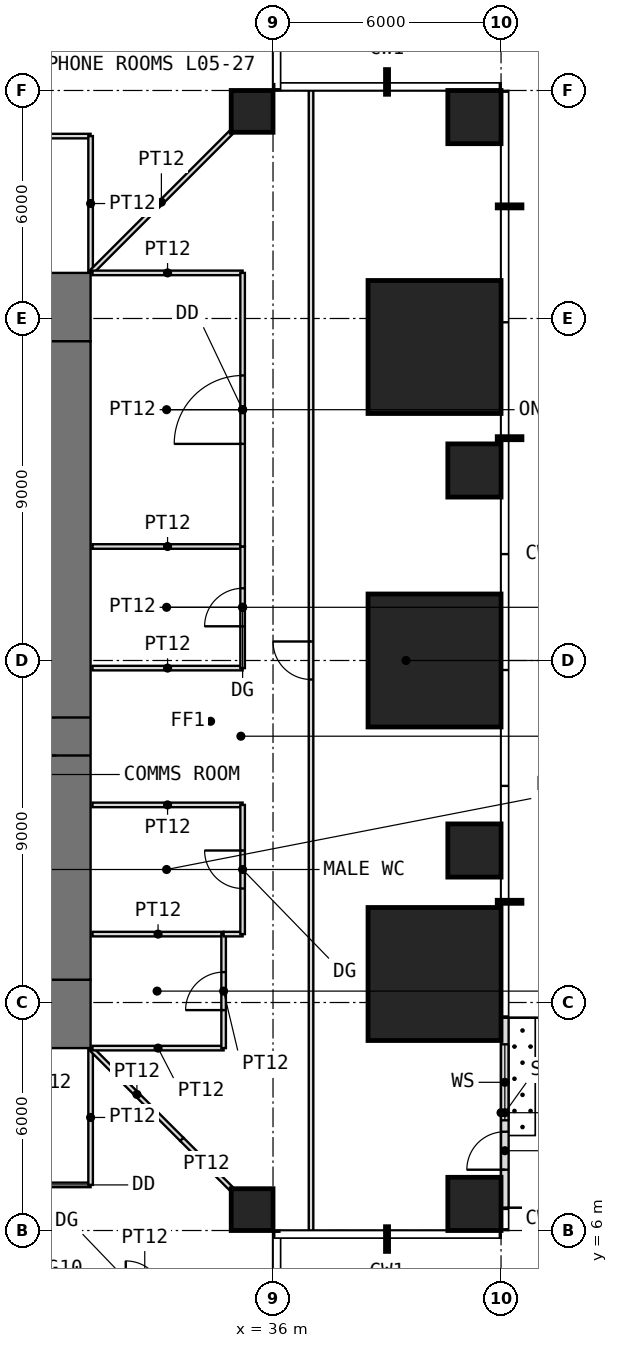
"""IFC4 building model, lengths in metres.
Left out: names, types, materials, properties, quantities, classifications, styles, units other than length and angle.
Written with IfcOpenShell. Run it as: python <this file> out.ifc"""

import sys

from ifc_helpers import new_model, si_unit, direction, frame, frame_2d, origin, origin_2d, place, context, subcontext, project, spatial, rectangle, extrude, element, fill, save


model = new_model("IFC4")
c1 = context("Model", 3, precision=1e-05, world=origin(), true_north=direction((0.0, 1.0)))
c2 = subcontext(c1, "Body", "Model", "MODEL_VIEW")
j1 = project(units=[si_unit("LENGTHUNIT", "METRE"), si_unit("PLANEANGLEUNIT", "RADIAN")], contexts=[c1])
p1 = place(None, origin())
s1 = spatial("IfcSite", under=j1, at=p1, CompositionType="ELEMENT")
p2 = place(p1, origin())
s2 = spatial("IfcBuilding", under=s1, at=p2, CompositionType="ELEMENT")
p3 = place(p2, frame((0.0, 0.0, 26.5)))
s3 = spatial("IfcBuildingStorey", under=s2, at=p3, CompositionType="ELEMENT", Elevation=26.5)
p4 = place(p3, frame((35.45, 6.55, 0.0), z_axis=(0.0, 0.0, 1.0), x_axis=(1.0, 0.0, 0.0)))
e1 = element("IfcColumn", 1, at=p4, inside=s3, PredefinedType="COLUMN", context=c2, shape_type="SweptSolid", body=[
    extrude(rectangle(XDim=1.1, YDim=1.1, at=origin_2d()), origin(), (0.0, 0.0, 1.0), 4.0),
])
p5 = place(p3, frame((41.3, 6.7, 0.0), z_axis=(0.0, 0.0, 1.0), x_axis=(1.0, 0.0, 0.0)))
e2 = element("IfcColumn", 2, at=p5, inside=s3, PredefinedType="COLUMN", context=c2, shape_type="SweptSolid", body=[
    extrude(rectangle(XDim=1.4, YDim=1.4, at=origin_2d()), origin(), (0.0, 0.0, 1.0), 4.0),
])
p6 = place(p3, frame((40.25, 12.75, 0.0), z_axis=(0.0, 0.0, 1.0), x_axis=(1.0, 0.0, 0.0)))
e3 = element("IfcColumn", 3, at=p6, inside=s3, PredefinedType="COLUMN", context=c2, shape_type="SweptSolid", body=[
    extrude(rectangle(XDim=3.5, YDim=3.5, at=origin_2d()), origin(), (0.0, 0.0, 1.0), 4.0),
])
p7 = place(p3, frame((41.3, 16.0, 0.0), z_axis=(0.0, 0.0, 1.0), x_axis=(1.0, 0.0, 0.0)))
e4 = element("IfcColumn", 4, at=p7, inside=s3, PredefinedType="COLUMN", context=c2, shape_type="SweptSolid", body=[
    extrude(rectangle(XDim=1.4, YDim=1.4, at=origin_2d()), origin(), (0.0, 0.0, 1.0), 4.0),
])
p8 = place(p3, frame((40.25, 21.0, 0.0), z_axis=(0.0, 0.0, 1.0), x_axis=(1.0, 0.0, 0.0)))
e5 = element("IfcColumn", 5, at=p8, inside=s3, PredefinedType="COLUMN", context=c2, shape_type="SweptSolid", body=[
    extrude(rectangle(XDim=3.5, YDim=3.5, at=origin_2d()), origin(), (0.0, 0.0, 1.0), 4.0),
])
p9 = place(p3, frame((41.3, 26.0, 0.0), z_axis=(0.0, 0.0, 1.0), x_axis=(1.0, 0.0, 0.0)))
e6 = element("IfcColumn", 6, at=p9, inside=s3, PredefinedType="COLUMN", context=c2, shape_type="SweptSolid", body=[
    extrude(rectangle(XDim=1.4, YDim=1.4, at=origin_2d()), origin(), (0.0, 0.0, 1.0), 4.0),
])
p10 = place(p3, frame((40.25, 29.25, 0.0), z_axis=(0.0, 0.0, 1.0), x_axis=(1.0, 0.0, 0.0)))
e7 = element("IfcColumn", 7, at=p10, inside=s3, PredefinedType="COLUMN", context=c2, shape_type="SweptSolid", body=[
    extrude(rectangle(XDim=3.5, YDim=3.5, at=origin_2d()), origin(), (0.0, 0.0, 1.0), 4.0),
])
p11 = place(p3, frame((35.45, 35.45, 0.0), z_axis=(0.0, 0.0, 1.0), x_axis=(1.0, 0.0, 0.0)))
e8 = element("IfcColumn", 8, at=p11, inside=s3, PredefinedType="COLUMN", context=c2, shape_type="SweptSolid", body=[
    extrude(rectangle(XDim=1.1, YDim=1.1, at=origin_2d()), origin(), (0.0, 0.0, 1.0), 4.0),
])
p12 = place(p3, frame((41.3, 35.3, 0.0), z_axis=(0.0, 0.0, 1.0), x_axis=(1.0, 0.0, 0.0)))
e9 = element("IfcColumn", 9, at=p12, inside=s3, PredefinedType="COLUMN", context=c2, shape_type="SweptSolid", body=[
    extrude(rectangle(XDim=1.4, YDim=1.4, at=origin_2d()), origin(), (0.0, 0.0, 1.0), 4.0),
])
p13 = place(p3, frame((42.1, 6.6, 0.0), z_axis=(0.0, 0.0, 1.0), x_axis=(0.0, 1.0, 0.0)))
e10 = element("IfcWall", 10, at=p13, inside=s3, PredefinedType="USERDEFINED", context=c2, shape_type="SweptSolid", body=[
    extrude(rectangle(XDim=5.0, YDim=0.2, at=frame_2d((2.5, 0.0))), origin(), (0.0, 0.0, 1.0), 3.75),
])
p14 = place(p13, frame((1.0, 0.0, 0.0)))
e11 = element("IfcOpeningElement", 11, at=p14, cuts=e10, PredefinedType="OPENING", context=c2, shape_type="SweptSolid", body=[
    extrude(rectangle(XDim=1.0, YDim=2.4, at=frame_2d((0.5, 1.2))), frame((0.0, 0.11, 0.0), z_axis=(0.0, -1.0, 0.0), x_axis=(1.0, 0.0, 0.0)), (0.0, 0.0, 1.0), 0.22),
])
p15 = place(p13, frame((2.3, 0.0, 0.3)))
e12 = element("IfcOpeningElement", 12, at=p15, cuts=e10, PredefinedType="OPENING", context=c2, shape_type="SweptSolid", body=[
    extrude(rectangle(XDim=2.0, YDim=2.7, at=frame_2d((1.0, 1.35))), frame((0.0, 0.11, 0.0), z_axis=(0.0, -1.0, 0.0), x_axis=(1.0, 0.0, 0.0)), (0.0, 0.0, 1.0), 0.22),
])
p16 = place(p3, frame((10.8, 11.7, -0.05), z_axis=(0.0, 0.0, 1.0), x_axis=(1.0, 0.0, 0.0)))
e13 = element("IfcWall", 13, at=p16, inside=s3, PredefinedType="SHEAR", context=c2, shape_type="SweptSolid", body=[
    extrude(rectangle(XDim=20.4, YDim=1.8, at=frame_2d((10.2, 0.0))), origin(), (0.0, 0.0, 1.0), 4.0),
])
p17 = place(p16, frame((9.2, 0.0, 0.05)))
e14 = element("IfcOpeningElement", 14, at=p17, cuts=e13, PredefinedType="OPENING", context=c2, shape_type="SweptSolid", body=[
    extrude(rectangle(XDim=2.0, YDim=2.2, at=frame_2d((1.0, 1.1))), frame((0.0, 0.91, 0.0), z_axis=(0.0, -1.0, 0.0), x_axis=(1.0, 0.0, 0.0)), (0.0, 0.0, 1.0), 1.82),
])
p18 = place(p3, frame((10.8, 30.3, -0.05), z_axis=(0.0, 0.0, 1.0), x_axis=(1.0, 0.0, 0.0)))
e15 = element("IfcWall", 15, at=p18, inside=s3, PredefinedType="SHEAR", context=c2, shape_type="SweptSolid", body=[
    extrude(rectangle(XDim=20.4, YDim=1.8, at=frame_2d((10.2, 0.0))), origin(), (0.0, 0.0, 1.0), 4.0),
])
p19 = place(p18, frame((9.2, 0.0, 0.05)))
e16 = element("IfcOpeningElement", 16, at=p19, cuts=e15, PredefinedType="OPENING", context=c2, shape_type="SweptSolid", body=[
    extrude(rectangle(XDim=2.0, YDim=2.2, at=frame_2d((1.0, 1.1))), frame((0.0, 0.91, 0.0), z_axis=(0.0, -1.0, 0.0), x_axis=(1.0, 0.0, 0.0)), (0.0, 0.0, 1.0), 1.82),
])
p20 = place(p3, frame((30.3, 12.6, -0.05), z_axis=(0.0, 0.0, 1.0), x_axis=(0.0, 1.0, 0.0)))
e17 = element("IfcWall", 17, at=p20, inside=s3, PredefinedType="SHEAR", context=c2, shape_type="SweptSolid", body=[
    extrude(rectangle(XDim=16.8, YDim=1.8, at=frame_2d((8.4, 0.0))), origin(), (0.0, 0.0, 1.0), 4.0),
])
p21 = place(p20, frame((5.9, 0.0, 0.05)))
e18 = element("IfcOpeningElement", 18, at=p21, cuts=e17, PredefinedType="OPENING", context=c2, shape_type="SweptSolid", body=[
    extrude(rectangle(XDim=1.0, YDim=2.2, at=frame_2d((0.5, 1.1))), frame((0.0, 0.91, 0.0), z_axis=(0.0, -1.0, 0.0), x_axis=(1.0, 0.0, 0.0)), (0.0, 0.0, 1.0), 1.82),
])
p22 = place(p3, frame((23.6, 7.2, 0.0), z_axis=(0.0, 0.0, 1.0), x_axis=(1.0, 0.0, 0.0)))
e19 = element("IfcWall", 19, at=p22, inside=s3, PredefinedType="PARTITIONING", context=c2, shape_type="SweptSolid", body=[
    extrude(rectangle(XDim=7.6, YDim=0.12, at=frame_2d((3.8, 0.0))), origin(), (0.0, 0.0, 1.0), 3.75),
])
p23 = place(p22, frame((2.9, 0.0, 0.0)))
e20 = element("IfcOpeningElement", 20, at=p23, cuts=e19, PredefinedType="OPENING", context=c2, shape_type="SweptSolid", body=[
    extrude(rectangle(XDim=1.8, YDim=2.4, at=frame_2d((0.9, 1.2))), frame((0.0, 0.07, 0.0), z_axis=(0.0, -1.0, 0.0), x_axis=(1.0, 0.0, 0.0)), (0.0, 0.0, 1.0), 0.14),
])
p24 = place(p3, frame((27.0, 34.8, 0.0), z_axis=(0.0, 0.0, 1.0), x_axis=(1.0, 0.0, 0.0)))
e21 = element("IfcWall", 21, at=p24, inside=s3, PredefinedType="PARTITIONING", context=c2, shape_type="SweptSolid", body=[
    extrude(rectangle(XDim=4.2, YDim=0.12, at=frame_2d((2.1, 0.0))), origin(), (0.0, 0.0, 1.0), 3.75),
])
p25 = place(p24, frame((1.6, 0.0, 0.0)))
e22 = element("IfcOpeningElement", 22, at=p25, cuts=e21, PredefinedType="OPENING", context=c2, shape_type="SweptSolid", body=[
    extrude(rectangle(XDim=1.0, YDim=2.4, at=frame_2d((0.5, 1.2))), frame((0.0, 0.07, 0.0), z_axis=(0.0, -1.0, 0.0), x_axis=(1.0, 0.0, 0.0)), (0.0, 0.0, 1.0), 0.14),
])
for number, where, z_axis, x_axis in (
    (23, (31.2, 7.2, 0.0), (0.0, 0.0, 1.0), (0.0, 1.0, 0.0)),
    (24, (31.2, 31.25, 0.0), (0.0, 0.0, 1.0), (0.0, 1.0, 0.0)),
):
    element("IfcWall", number, at=place(p3, frame(where, z_axis=z_axis, x_axis=x_axis)), inside=s3, PredefinedType="PARTITIONING", context=c2, shape_type="SweptSolid", body=[
        extrude(rectangle(XDim=3.55, YDim=0.12, at=frame_2d((1.775, 0.0))), origin(), (0.0, 0.0, 1.0), 3.75),
    ])
p26 = place(p3, frame((31.235, 10.765, 0.0), z_axis=(0.0, 0.0, 1.0), x_axis=(0.707106781187, -0.707106781187, 0.0)))
e25 = element("IfcWall", 25, at=p26, inside=s3, PredefinedType="PARTITIONING", context=c2, shape_type="SweptSolid", body=[
    extrude(rectangle(XDim=3.346, YDim=0.12, at=frame_2d((1.673, 0.0))), origin(), (0.0, 0.0, 1.0), 3.75),
])
p27 = place(p3, frame((31.235, 31.235, 0.0), z_axis=(0.0, 0.0, 1.0), x_axis=(0.707106781187, 0.707106781187, 0.0)))
e26 = element("IfcWall", 26, at=p27, inside=s3, PredefinedType="PARTITIONING", context=c2, shape_type="SweptSolid", body=[
    extrude(rectangle(XDim=5.168, YDim=0.12, at=frame_2d((2.584, 0.0))), origin(), (0.0, 0.0, 1.0), 3.75),
])
for number, where, z_axis, x_axis in (
    (27, (31.25, 10.8, 0.0), (0.0, 0.0, 1.0), (1.0, 0.0, 0.0)),
    (28, (31.25, 13.8, 0.0), (0.0, 0.0, 1.0), (1.0, 0.0, 0.0)),
):
    element("IfcWall", number, at=place(p3, frame(where, z_axis=z_axis, x_axis=x_axis)), inside=s3, PredefinedType="PARTITIONING", context=c2, shape_type="SweptSolid", body=[
        extrude(rectangle(XDim=3.45, YDim=0.12, at=frame_2d((1.725, 0.0))), origin(), (0.0, 0.0, 1.0), 3.75),
    ])
for number, where, z_axis, x_axis in (
    (29, (31.25, 17.2, 0.0), (0.0, 0.0, 1.0), (1.0, 0.0, 0.0)),
    (30, (31.25, 20.8, 0.0), (0.0, 0.0, 1.0), (1.0, 0.0, 0.0)),
    (31, (31.25, 24.0, 0.0), (0.0, 0.0, 1.0), (1.0, 0.0, 0.0)),
    (32, (31.25, 31.2, 0.0), (0.0, 0.0, 1.0), (1.0, 0.0, 0.0)),
):
    element("IfcWall", number, at=place(p3, frame(where, z_axis=z_axis, x_axis=x_axis)), inside=s3, PredefinedType="PARTITIONING", context=c2, shape_type="SweptSolid", body=[
        extrude(rectangle(XDim=3.95, YDim=0.12, at=frame_2d((1.975, 0.0))), origin(), (0.0, 0.0, 1.0), 3.75),
    ])
p28 = place(p3, frame((33.602, 8.398, 0.0), z_axis=(0.0, 0.0, 1.0), x_axis=(0.707106781187, -0.707106781187, 0.0)))
e33 = element("IfcWall", 33, at=p28, inside=s3, PredefinedType="PARTITIONING", context=c2, shape_type="SweptSolid", body=[
    extrude(rectangle(XDim=1.822, YDim=0.12, at=frame_2d((0.911, 0.0))), origin(), (0.0, 0.0, 1.0), 3.75),
])
p29 = place(p3, frame((34.7, 10.8, 0.0), z_axis=(0.0, 0.0, 1.0), x_axis=(0.0, 1.0, 0.0)))
e34 = element("IfcWall", 34, at=p29, inside=s3, PredefinedType="PARTITIONING", context=c2, shape_type="SweptSolid", body=[
    extrude(rectangle(XDim=3.0, YDim=0.12, at=frame_2d((1.5, 0.0))), origin(), (0.0, 0.0, 1.0), 3.75),
])
p30 = place(p29, frame((1.0, 0.0, 0.0)))
e35 = element("IfcOpeningElement", 35, at=p30, cuts=e34, PredefinedType="OPENING", context=c2, shape_type="SweptSolid", body=[
    extrude(rectangle(XDim=1.0, YDim=2.2, at=frame_2d((0.5, 1.1))), frame((0.0, 0.07, 0.0), z_axis=(0.0, -1.0, 0.0), x_axis=(1.0, 0.0, 0.0)), (0.0, 0.0, 1.0), 0.14),
])
p31 = place(p3, frame((34.7, 13.8, 0.0), z_axis=(0.0, 0.0, 1.0), x_axis=(1.0, 0.0, 0.0)))
e36 = element("IfcWall", 36, at=p31, inside=s3, PredefinedType="PARTITIONING", context=c2, shape_type="SweptSolid", body=[
    extrude(rectangle(XDim=0.5, YDim=0.12, at=frame_2d((0.25, 0.0))), origin(), (0.0, 0.0, 1.0), 3.75),
])
p32 = place(p3, frame((35.2, 13.8, 0.0), z_axis=(0.0, 0.0, 1.0), x_axis=(0.0, 1.0, 0.0)))
e37 = element("IfcWall", 37, at=p32, inside=s3, PredefinedType="PARTITIONING", context=c2, shape_type="SweptSolid", body=[
    extrude(rectangle(XDim=3.4, YDim=0.12, at=frame_2d((1.7, 0.0))), origin(), (0.0, 0.0, 1.0), 3.75),
])
p33 = place(p32, frame((1.2, 0.0, 0.0)))
e38 = element("IfcOpeningElement", 38, at=p33, cuts=e37, PredefinedType="OPENING", context=c2, shape_type="SweptSolid", body=[
    extrude(rectangle(XDim=1.0, YDim=2.4, at=frame_2d((0.5, 1.2))), frame((0.0, 0.07, 0.0), z_axis=(0.0, -1.0, 0.0), x_axis=(1.0, 0.0, 0.0)), (0.0, 0.0, 1.0), 0.14),
])
p34 = place(p3, frame((35.2, 20.8, 0.0), z_axis=(0.0, 0.0, 1.0), x_axis=(0.0, 1.0, 0.0)))
e39 = element("IfcWall", 39, at=p34, inside=s3, PredefinedType="PARTITIONING", context=c2, shape_type="SweptSolid", body=[
    extrude(rectangle(XDim=3.2, YDim=0.12, at=frame_2d((1.6, 0.0))), origin(), (0.0, 0.0, 1.0), 3.75),
])
p35 = place(p34, frame((1.1, 0.0, 0.0)))
e40 = element("IfcOpeningElement", 40, at=p35, cuts=e39, PredefinedType="OPENING", context=c2, shape_type="SweptSolid", body=[
    extrude(rectangle(XDim=1.0, YDim=2.4, at=frame_2d((0.5, 1.2))), frame((0.0, 0.07, 0.0), z_axis=(0.0, -1.0, 0.0), x_axis=(1.0, 0.0, 0.0)), (0.0, 0.0, 1.0), 0.14),
])
p36 = place(p3, frame((35.2, 24.0, 0.0), z_axis=(0.0, 0.0, 1.0), x_axis=(0.0, 1.0, 0.0)))
e41 = element("IfcWall", 41, at=p36, inside=s3, PredefinedType="PARTITIONING", context=c2, shape_type="SweptSolid", body=[
    extrude(rectangle(XDim=7.2, YDim=0.12, at=frame_2d((3.6, 0.0))), origin(), (0.0, 0.0, 1.0), 3.75),
])
p37 = place(p36, frame((2.7, 0.0, 0.0)))
e42 = element("IfcOpeningElement", 42, at=p37, cuts=e41, PredefinedType="OPENING", context=c2, shape_type="SweptSolid", body=[
    extrude(rectangle(XDim=1.8, YDim=2.4, at=frame_2d((0.9, 1.2))), frame((0.0, 0.07, 0.0), z_axis=(0.0, -1.0, 0.0), x_axis=(1.0, 0.0, 0.0)), (0.0, 0.0, 1.0), 0.14),
])
p38 = place(p3, frame((37.0, 6.0, 0.0), z_axis=(0.0, 0.0, 1.0), x_axis=(0.0, 1.0, 0.0)))
e43 = element("IfcWall", 43, at=p38, inside=s3, PredefinedType="PARTITIONING", context=c2, shape_type="SweptSolid", body=[
    extrude(rectangle(XDim=30.0, YDim=0.12, at=frame_2d((15.0, 0.0))), origin(), (0.0, 0.0, 1.0), 3.75),
])
p39 = place(p38, frame((14.5, 0.0, 0.0)))
e44 = element("IfcOpeningElement", 44, at=p39, cuts=e43, PredefinedType="OPENING", context=c2, shape_type="SweptSolid", body=[
    extrude(rectangle(XDim=1.0, YDim=2.4, at=frame_2d((0.5, 1.2))), frame((0.0, 0.07, 0.0), z_axis=(0.0, -1.0, 0.0), x_axis=(1.0, 0.0, 0.0)), (0.0, 0.0, 1.0), 0.14),
])
p40 = place(p14, origin())
e45 = element("IfcDoor", 45, at=p40, inside=s3, OperationType="SINGLE_SWING_LEFT", PredefinedType="DOOR", context=c2, shape_type="SweptSolid", body=[
    extrude(rectangle(XDim=1.0, YDim=2.4, at=frame_2d((0.5, 1.2))), frame((0.0, 0.025, 0.0), z_axis=(0.0, -1.0, 0.0), x_axis=(1.0, 0.0, 0.0)), (0.0, 0.0, 1.0), 0.05),
])
fill(e11, e45)
p41 = place(p15, origin())
e46 = element("IfcWindow", 46, at=p41, inside=s3, PartitioningType="SINGLE_PANEL", PredefinedType="WINDOW", context=c2, shape_type="SweptSolid", body=[
    extrude(rectangle(XDim=2.0, YDim=2.7, at=frame_2d((1.0, 1.35))), frame((0.0, 0.03, 0.0), z_axis=(0.0, -1.0, 0.0), x_axis=(1.0, 0.0, 0.0)), (0.0, 0.0, 1.0), 0.06),
])
fill(e12, e46)
p42 = place(p21, origin())
e47 = element("IfcDoor", 47, at=p42, inside=s3, OperationType="SINGLE_SWING_LEFT", PredefinedType="DOOR", context=c2, shape_type="SweptSolid", body=[
    extrude(rectangle(XDim=1.0, YDim=2.2, at=frame_2d((0.5, 1.1))), frame((0.0, 0.025, 0.0), z_axis=(0.0, -1.0, 0.0), x_axis=(1.0, 0.0, 0.0)), (0.0, 0.0, 1.0), 0.05),
])
fill(e18, e47)
p43 = place(p30, origin())
e48 = element("IfcDoor", 48, at=p43, inside=s3, OperationType="SINGLE_SWING_LEFT", PredefinedType="DOOR", context=c2, shape_type="SweptSolid", body=[
    extrude(rectangle(XDim=1.0, YDim=2.2, at=frame_2d((0.5, 1.1))), frame((0.0, 0.025, 0.0), z_axis=(0.0, -1.0, 0.0), x_axis=(1.0, 0.0, 0.0)), (0.0, 0.0, 1.0), 0.05),
])
fill(e35, e48)
p44 = place(p33, origin())
e49 = element("IfcDoor", 49, at=p44, inside=s3, OperationType="SINGLE_SWING_RIGHT", PredefinedType="DOOR", context=c2, shape_type="SweptSolid", body=[
    extrude(rectangle(XDim=1.0, YDim=2.4, at=frame_2d((0.5, 1.2))), frame((0.0, 0.025, 0.0), z_axis=(0.0, -1.0, 0.0), x_axis=(1.0, 0.0, 0.0)), (0.0, 0.0, 1.0), 0.05),
])
fill(e38, e49)
p45 = place(p35, origin())
e50 = element("IfcDoor", 50, at=p45, inside=s3, OperationType="SINGLE_SWING_LEFT", PredefinedType="DOOR", context=c2, shape_type="SweptSolid", body=[
    extrude(rectangle(XDim=1.0, YDim=2.4, at=frame_2d((0.5, 1.2))), frame((0.0, 0.025, 0.0), z_axis=(0.0, -1.0, 0.0), x_axis=(1.0, 0.0, 0.0)), (0.0, 0.0, 1.0), 0.05),
])
fill(e40, e50)
p46 = place(p37, origin())
e51 = element("IfcDoor", 51, at=p46, inside=s3, OperationType="DOUBLE_DOOR_SINGLE_SWING", PredefinedType="DOOR", context=c2, shape_type="SweptSolid", body=[
    extrude(rectangle(XDim=1.8, YDim=2.4, at=frame_2d((0.9, 1.2))), frame((0.0, 0.025, 0.0), z_axis=(0.0, -1.0, 0.0), x_axis=(1.0, 0.0, 0.0)), (0.0, 0.0, 1.0), 0.05),
])
fill(e42, e51)
p47 = place(p39, origin())
e52 = element("IfcDoor", 52, at=p47, inside=s3, OperationType="SINGLE_SWING_RIGHT", PredefinedType="DOOR", context=c2, shape_type="SweptSolid", body=[
    extrude(rectangle(XDim=1.0, YDim=2.4, at=frame_2d((0.5, 1.2))), frame((0.0, 0.025, 0.0), z_axis=(0.0, -1.0, 0.0), x_axis=(1.0, 0.0, 0.0)), (0.0, 0.0, 1.0), 0.05),
])
fill(e44, e52)
save(model, sys.argv[1])
